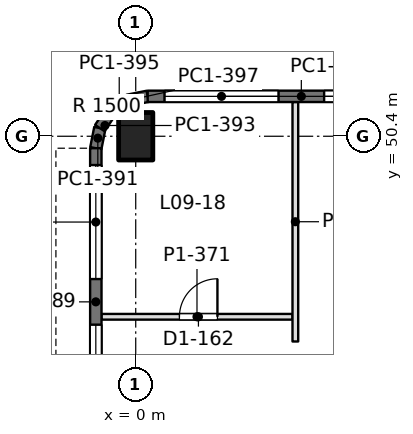
"""IFC4 building model, lengths in metres.
Left out: names, types, materials, properties, quantities, classifications, styles, units other than length and angle.
Written with IfcOpenShell. Run it as: python <this file> out.ifc"""

import sys

from ifc_helpers import new_model, si_unit, direction, frame, frame_2d, origin, origin_2d, place, context, subcontext, project, spatial, rectangle, extrude, element, fill, save


model = new_model("IFC4")
c1 = context("Model", 3, precision=1e-05, world=origin(), true_north=direction((0.0, 1.0)))
c2 = subcontext(c1, "Body", "Model", "MODEL_VIEW")
j1 = project(units=[si_unit("LENGTHUNIT", "METRE"), si_unit("PLANEANGLEUNIT", "RADIAN")], contexts=[c1])
p1 = place(None, origin())
s1 = spatial("IfcSite", under=j1, at=p1, CompositionType="ELEMENT")
p2 = place(p1, origin())
s2 = spatial("IfcBuilding", under=s1, at=p2, CompositionType="ELEMENT")
p3 = place(p2, frame((0.0, 0.0, 41.4)))
s3 = spatial("IfcBuildingStorey", under=s2, at=p3, CompositionType="ELEMENT", Elevation=41.4)
p4 = place(p3, frame((0.0, 50.4, 0.0), z_axis=(0.0, 0.0, 1.0), x_axis=(1.0, 0.0, 0.0)))
e1 = element("IfcColumn", 1, at=p4, inside=s3, PredefinedType="COLUMN", context=c2, shape_type="SweptSolid", body=[
    extrude(rectangle(XDim=0.9, YDim=1.25, at=origin_2d()), origin(), (0.0, 0.0, 1.0), 4.5),
])
p5 = place(p3, frame((-1.05, 42.0, 0.0), z_axis=(0.0, 0.0, 1.0), x_axis=(0.0, 1.0, 0.0)))
e2 = element("IfcWall", 2, at=p5, inside=s3, PredefinedType="SOLIDWALL", context=c2, shape_type="SweptSolid", body=[
    extrude(rectangle(XDim=8.085, YDim=0.3, at=frame_2d((4.042, 0.0))), origin(), (0.0, 0.0, 1.0), 4.34),
])
p6 = place(p5, frame((0.443, 0.0, 0.9)))
e3 = element("IfcOpeningElement", 3, at=p6, cuts=e2, PredefinedType="OPENING", context=c2, shape_type="SweptSolid", body=[
    extrude(rectangle(XDim=3.0, YDim=1.9, at=frame_2d((1.5, 0.95))), frame((0.0, 0.16, 0.0), z_axis=(0.0, -1.0, 0.0), x_axis=(1.0, 0.0, 0.0)), (0.0, 0.0, 1.0), 0.32),
])
p7 = place(p5, frame((4.643, 0.0, 0.9)))
e4 = element("IfcOpeningElement", 4, at=p7, cuts=e2, PredefinedType="OPENING", context=c2, shape_type="SweptSolid", body=[
    extrude(rectangle(XDim=3.0, YDim=1.9, at=frame_2d((1.5, 0.95))), frame((0.0, 0.16, 0.0), z_axis=(0.0, -1.0, 0.0), x_axis=(1.0, 0.0, 0.0)), (0.0, 0.0, 1.0), 0.32),
])
p8 = place(p3, frame((-1.05, 50.085, 0.0), z_axis=(0.0, 0.0, 1.0), x_axis=(0.195073962632, 0.980788534345, 0.0)))
e5 = element("IfcWall", 5, at=p8, inside=s3, PredefinedType="SOLIDWALL", context=c2, shape_type="SweptSolid", body=[
    extrude(rectangle(XDim=0.541, YDim=0.3, at=frame_2d((0.271, 0.0))), origin(), (0.0, 0.0, 1.0), 4.34),
])
for number, where, z_axis, x_axis in (
    (6, (-0.945, 50.615, 0.0), (0.0, 0.0, 1.0), (0.556, 0.831, 0.0)),
    (7, (-0.653, 51.052, 0.0), (0.0, 0.0, 1.0), (0.831, 0.556, 0.0)),
):
    element("IfcWall", number, at=place(p3, frame(where, z_axis=z_axis, x_axis=x_axis)), inside=s3, PredefinedType="SOLIDWALL", context=c2, shape_type="SweptSolid", body=[
        extrude(rectangle(XDim=0.526, YDim=0.3, at=frame_2d((0.263, 0.0))), origin(), (0.0, 0.0, 1.0), 4.34),
    ])
p9 = place(p3, frame((-0.216, 51.344, 0.0), z_axis=(0.0, 0.0, 1.0), x_axis=(0.980788534345, 0.195073962632, 0.0)))
e8 = element("IfcWall", 8, at=p9, inside=s3, PredefinedType="SOLIDWALL", context=c2, shape_type="SweptSolid", body=[
    extrude(rectangle(XDim=0.541, YDim=0.3, at=frame_2d((0.271, 0.0))), origin(), (0.0, 0.0, 1.0), 4.34),
])
p10 = place(p3, frame((0.315, 51.45, 0.0), z_axis=(0.0, 0.0, 1.0), x_axis=(1.0, 0.0, 0.0)))
e9 = element("IfcWall", 9, at=p10, inside=s3, PredefinedType="SOLIDWALL", context=c2, shape_type="SweptSolid", body=[
    extrude(rectangle(XDim=8.085, YDim=0.3, at=frame_2d((4.042, 0.0))), origin(), (0.0, 0.0, 1.0), 4.34),
])
p11 = place(p10, frame((0.443, 0.0, 0.9)))
e10 = element("IfcOpeningElement", 10, at=p11, cuts=e9, PredefinedType="OPENING", context=c2, shape_type="SweptSolid", body=[
    extrude(rectangle(XDim=3.0, YDim=1.9, at=frame_2d((1.5, 0.95))), frame((0.0, 0.16, 0.0), z_axis=(0.0, -1.0, 0.0), x_axis=(1.0, 0.0, 0.0)), (0.0, 0.0, 1.0), 0.32),
])
p12 = place(p10, frame((4.643, 0.0, 0.9)))
e11 = element("IfcOpeningElement", 11, at=p12, cuts=e9, PredefinedType="OPENING", context=c2, shape_type="SweptSolid", body=[
    extrude(rectangle(XDim=3.0, YDim=1.9, at=frame_2d((1.5, 0.95))), frame((0.0, 0.16, 0.0), z_axis=(0.0, -1.0, 0.0), x_axis=(1.0, 0.0, 0.0)), (0.0, 0.0, 1.0), 0.32),
])
p13 = place(p3, frame((-0.902, 45.65, 0.0), z_axis=(0.0, 0.0, 1.0), x_axis=(1.0, 0.0, 0.0)))
e12 = element("IfcWall", 12, at=p13, inside=s3, PredefinedType="PARTITIONING", context=c2, shape_type="SweptSolid", body=[
    extrude(rectangle(XDim=5.028, YDim=0.15, at=frame_2d((2.514, 0.0))), origin(), (0.0, 0.0, 1.0), 3.84),
])
p14 = place(p13, frame((2.052, 0.0, 0.0)))
e13 = element("IfcOpeningElement", 13, at=p14, cuts=e12, PredefinedType="OPENING", context=c2, shape_type="SweptSolid", body=[
    extrude(rectangle(XDim=1.0, YDim=2.2, at=frame_2d((0.5, 1.1))), frame((0.0, 0.085, 0.0), z_axis=(0.0, -1.0, 0.0), x_axis=(1.0, 0.0, 0.0)), (0.0, 0.0, 1.0), 0.17),
])
p15 = place(p3, frame((4.2, 45.0, 0.0), z_axis=(0.0, 0.0, 1.0), x_axis=(0.0, 1.0, 0.0)))
e14 = element("IfcWall", 14, at=p15, inside=s3, PredefinedType="PARTITIONING", context=c2, shape_type="SweptSolid", body=[
    extrude(rectangle(XDim=6.302, YDim=0.15, at=frame_2d((3.151, 0.0))), origin(), (0.0, 0.0, 1.0), 3.84),
])
p16 = place(p6, origin())
e15 = element("IfcWindow", 15, at=p16, inside=s3, PartitioningType="SINGLE_PANEL", PredefinedType="WINDOW", context=c2, shape_type="SweptSolid", body=[
    extrude(rectangle(XDim=3.0, YDim=1.9, at=frame_2d((1.5, 0.95))), frame((0.0, 0.03, 0.0), z_axis=(0.0, -1.0, 0.0), x_axis=(1.0, 0.0, 0.0)), (0.0, 0.0, 1.0), 0.06),
])
fill(e3, e15)
p17 = place(p7, origin())
e16 = element("IfcWindow", 16, at=p17, inside=s3, PartitioningType="SINGLE_PANEL", PredefinedType="WINDOW", context=c2, shape_type="SweptSolid", body=[
    extrude(rectangle(XDim=3.0, YDim=1.9, at=frame_2d((1.5, 0.95))), frame((0.0, 0.03, 0.0), z_axis=(0.0, -1.0, 0.0), x_axis=(1.0, 0.0, 0.0)), (0.0, 0.0, 1.0), 0.06),
])
fill(e4, e16)
p18 = place(p11, origin())
e17 = element("IfcWindow", 17, at=p18, inside=s3, PartitioningType="SINGLE_PANEL", PredefinedType="WINDOW", context=c2, shape_type="SweptSolid", body=[
    extrude(rectangle(XDim=3.0, YDim=1.9, at=frame_2d((1.5, 0.95))), frame((0.0, 0.03, 0.0), z_axis=(0.0, -1.0, 0.0), x_axis=(1.0, 0.0, 0.0)), (0.0, 0.0, 1.0), 0.06),
])
fill(e10, e17)
p19 = place(p12, origin())
e18 = element("IfcWindow", 18, at=p19, inside=s3, PartitioningType="SINGLE_PANEL", PredefinedType="WINDOW", context=c2, shape_type="SweptSolid", body=[
    extrude(rectangle(XDim=3.0, YDim=1.9, at=frame_2d((1.5, 0.95))), frame((0.0, 0.03, 0.0), z_axis=(0.0, -1.0, 0.0), x_axis=(1.0, 0.0, 0.0)), (0.0, 0.0, 1.0), 0.06),
])
fill(e11, e18)
p20 = place(p14, origin())
e19 = element("IfcDoor", 19, at=p20, inside=s3, OperationType="SINGLE_SWING_RIGHT", PredefinedType="DOOR", context=c2, shape_type="SweptSolid", body=[
    extrude(rectangle(XDim=1.0, YDim=2.2, at=frame_2d((0.5, 1.1))), frame((0.0, 0.025, 0.0), z_axis=(0.0, -1.0, 0.0), x_axis=(1.0, 0.0, 0.0)), (0.0, 0.0, 1.0), 0.05),
])
fill(e13, e19)
save(model, sys.argv[1])
